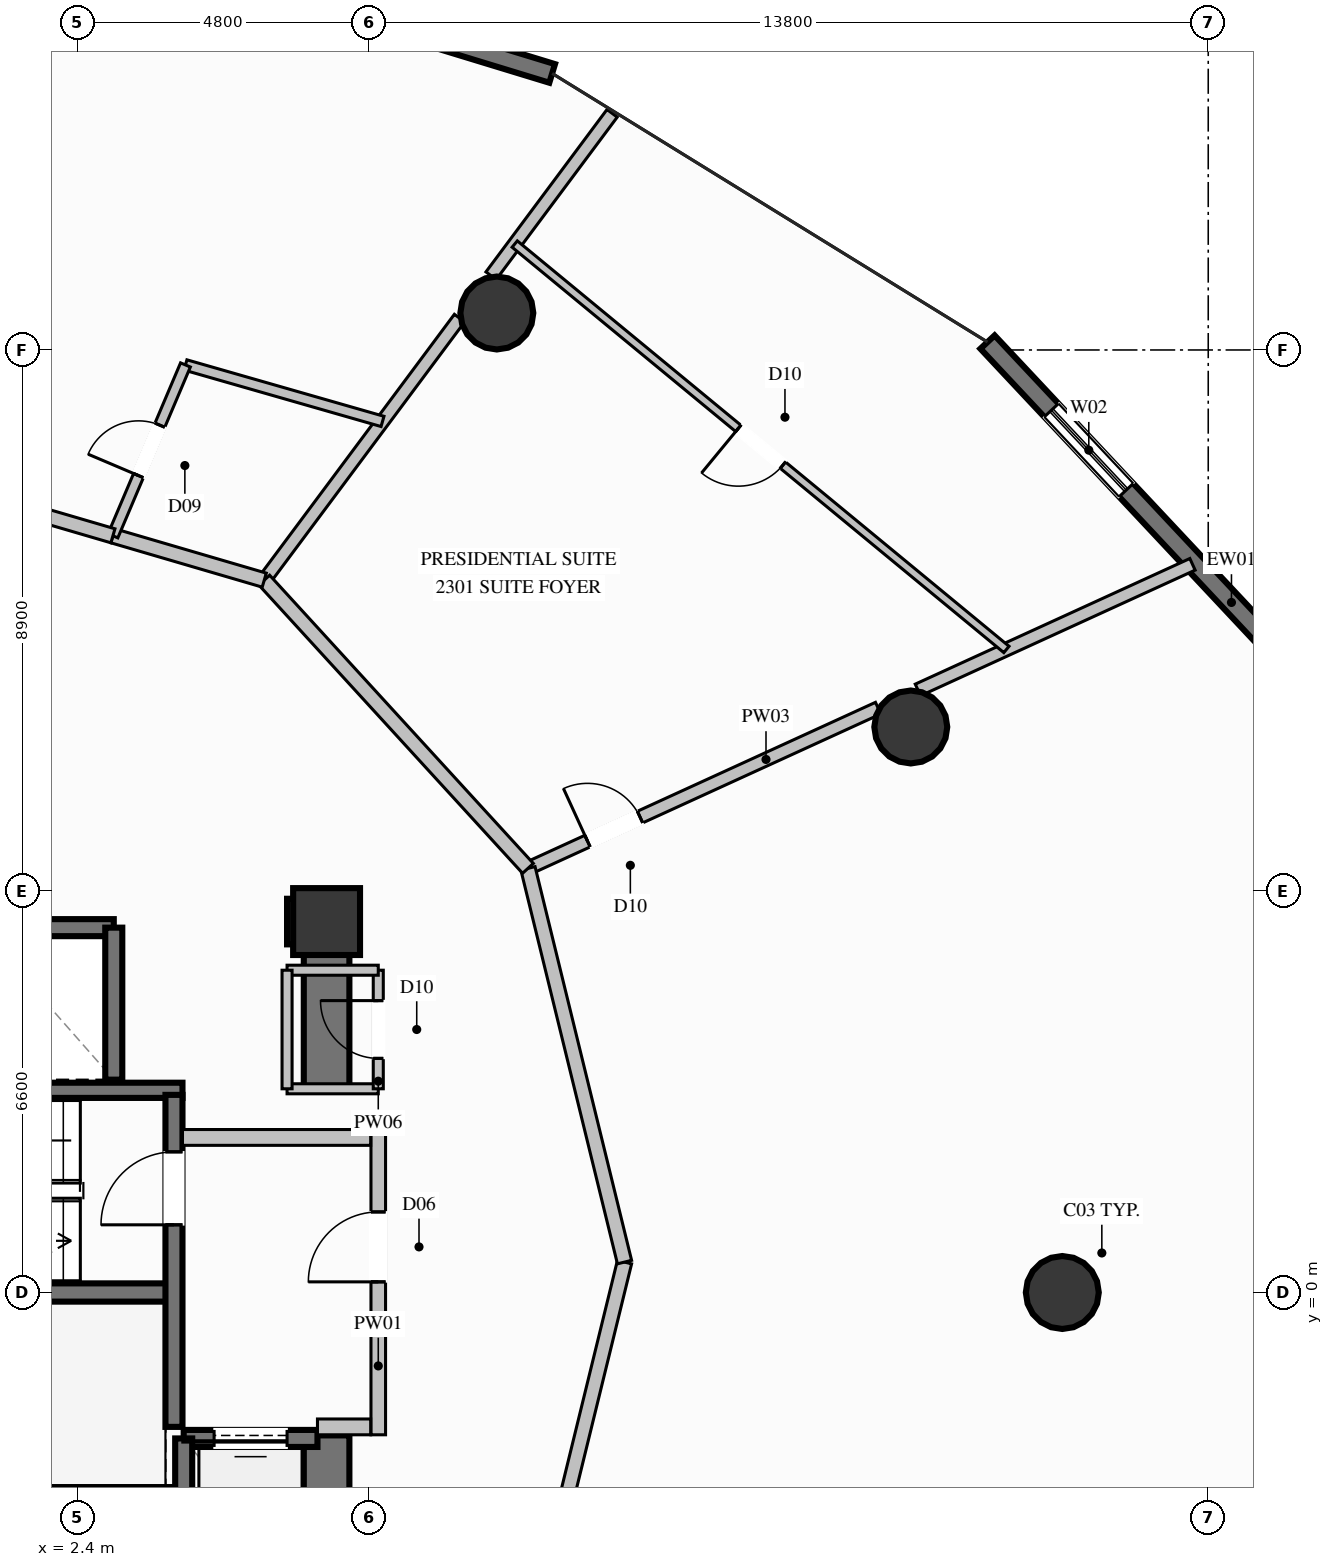
"""IFC4 building model, lengths in metres.
Left out: names, types, materials, properties, quantities, classifications, styles, units other than length and angle.
Written with IfcOpenShell. Run it as: python <this file> out.ifc"""

import sys

from ifc_helpers import new_model, si_unit, direction, frame, frame_2d, origin, origin_2d, place, context, subcontext, project, spatial, rectangle, circle, extrude, element, fill, save


model = new_model("IFC4")
c1 = context("Model", 3, precision=1e-05, world=origin(), true_north=direction((0.0, 1.0)))
c2 = subcontext(c1, "Body", "Model", "MODEL_VIEW")
j1 = project(units=[si_unit("LENGTHUNIT", "METRE"), si_unit("PLANEANGLEUNIT", "RADIAN")], contexts=[c1])
p1 = place(None, origin())
s1 = spatial("IfcSite", under=j1, at=p1, CompositionType="ELEMENT")
p2 = place(p1, origin())
s2 = spatial("IfcBuilding", under=s1, at=p2, CompositionType="ELEMENT")
p3 = place(p2, frame((0.0, 0.0, 86.0)))
s3 = spatial("IfcBuildingStorey", under=s2, at=p3, CompositionType="ELEMENT", Elevation=86.0)
p4 = place(p3, frame((6.5, 6.1, 0.0), z_axis=(0.0, 0.0, 1.0), x_axis=(1.0, 0.0, 0.0)))
e1 = element("IfcColumn", 1, at=p4, inside=s3, PredefinedType="COLUMN", context=c2, shape_type="SweptSolid", body=[
    extrude(rectangle(XDim=1.1, YDim=1.1, at=origin_2d()), origin(), (0.0, 0.0, 1.0), 3.6),
])
p5 = place(p3, frame((-3.99, 0.0, 0.0), z_axis=(0.0, 0.0, 1.0), x_axis=(1.0, 0.0, 0.0)))
e2 = element("IfcWall", 2, at=p5, inside=s3, PredefinedType="SHEAR", context=c2, shape_type="SweptSolid", body=[
    extrude(rectangle(XDim=7.98, YDim=0.3, at=frame_2d((3.99, 0.0))), origin(), (0.0, 0.0, 1.0), 3.6),
])
for number, where, z_axis, x_axis in (
    (3, (-4.13, -3.325, 0.0), (0.0, 0.0, 1.0), (1.0, 0.0, 0.0)),
    (4, (-4.13, 3.325, 0.0), (0.0, 0.0, 1.0), (1.0, 0.0, 0.0)),
):
    element("IfcWall", number, at=place(p3, frame(where, z_axis=z_axis, x_axis=x_axis)), inside=s3, PredefinedType="SOLIDWALL", context=c2, shape_type="SweptSolid", body=[
        extrude(rectangle(XDim=8.26, YDim=0.25, at=frame_2d((4.13, 0.0))), origin(), (0.0, 0.0, 1.0), 3.6),
    ])
p6 = place(p3, frame((5.85, 6.1, 0.0), z_axis=(0.0, 0.0, 1.0), x_axis=(1.0, 0.0, 0.0)))
e5 = element("IfcWall", 5, at=p6, inside=s3, PredefinedType="SHEAR", context=c2, shape_type="SweptSolid", body=[
    extrude(rectangle(XDim=0.275, YDim=0.75, at=frame_2d((0.137, 0.0))), origin(), (0.0, 0.0, 1.0), 3.6),
])
p7 = place(p3, frame((6.5, -6.475, 0.0), z_axis=(0.0, 0.0, 1.0), x_axis=(0.0, 1.0, 0.0)))
e6 = element("IfcWall", 6, at=p7, inside=s3, PredefinedType="SHEAR", context=c2, shape_type="SweptSolid", body=[
    extrude(rectangle(XDim=4.125, YDim=0.75, at=frame_2d((2.062, 0.0))), origin(), (0.0, 0.0, 1.0), 3.6),
])
p8 = place(p3, frame((6.5, 3.35, 0.0), z_axis=(0.0, 0.0, 1.0), x_axis=(0.0, 1.0, 0.0)))
e7 = element("IfcWall", 7, at=p8, inside=s3, PredefinedType="SHEAR", context=c2, shape_type="SweptSolid", body=[
    extrude(rectangle(XDim=3.125, YDim=0.75, at=frame_2d((1.562, 0.0))), origin(), (0.0, 0.0, 1.0), 3.6),
])
for number, where, z_axis, x_axis in (
    (8, (18.6, 0.0, 0.0), (0.0, 0.0, 1.0), (1.0, 0.0, 0.0)),
    (9, (16.108, 9.3, 0.0), (0.0, 0.0, 1.0), (1.0, 0.0, 0.0)),
    (10, (9.3, 16.108, 0.0), (0.0, 0.0, 1.0), (1.0, 0.0, 0.0)),
):
    element("IfcColumn", number, at=place(p3, frame(where, z_axis=z_axis, x_axis=x_axis)), inside=s3, PredefinedType="COLUMN", context=c2, shape_type="SweptSolid", body=[
        extrude(circle(Radius=0.6, at=origin_2d()), origin(), (0.0, 0.0, 1.0), 3.6),
    ])
p9 = place(p3, frame((17.37, 15.63, 0.0), z_axis=(0.0, 0.0, 1.0), x_axis=(0.683723849235, -0.729740843031, 0.0)))
e11 = element("IfcWall", 11, at=p9, inside=s3, PredefinedType="SOLIDWALL", context=c2, shape_type="SweptSolid", body=[
    extrude(rectangle(XDim=8.149, YDim=0.32, at=frame_2d((4.075, 0.0))), origin(), (0.0, 0.0, 1.0), 3.34),
])
p10 = place(p9, frame((1.536, 0.0, 0.35)))
e12 = element("IfcOpeningElement", 12, at=p10, cuts=e11, PredefinedType="OPENING", context=c2, shape_type="SweptSolid", body=[
    extrude(rectangle(XDim=1.8, YDim=2.6, at=frame_2d((0.9, 1.3))), frame((0.0, 0.17, 0.0), z_axis=(0.0, -1.0, 0.0), x_axis=(1.0, 0.0, 0.0)), (0.0, 0.0, 1.0), 0.34),
])
p11 = place(p3, frame((2.164, 22.503, 0.0), z_axis=(0.0, 0.0, 1.0), x_axis=(0.956472250056, -0.291823293917, 0.0)))
e13 = element("IfcWall", 13, at=p11, inside=s3, PredefinedType="SOLIDWALL", context=c2, shape_type="SweptSolid", body=[
    extrude(rectangle(XDim=8.412, YDim=0.32, at=frame_2d((4.206, 0.0))), origin(), (0.0, 0.0, 1.0), 3.34),
])
p12 = place(p11, frame((3.306, 0.0, 0.35)))
e14 = element("IfcOpeningElement", 14, at=p12, cuts=e13, PredefinedType="OPENING", context=c2, shape_type="SweptSolid", body=[
    extrude(rectangle(XDim=1.8, YDim=2.6, at=frame_2d((0.9, 1.3))), frame((0.0, 0.17, 0.0), z_axis=(0.0, -1.0, 0.0), x_axis=(1.0, 0.0, 0.0)), (0.0, 0.0, 1.0), 0.34),
])
p13 = place(p3, frame((3.0, 6.0, 0.0), z_axis=(0.0, 0.0, 1.0), x_axis=(-1.0, 0.0, 0.0)))
e15 = element("IfcWall", 15, at=p13, inside=s3, PredefinedType="SOLIDWALL", context=c2, shape_type="SweptSolid", body=[
    extrude(rectangle(XDim=2.2, YDim=0.28, at=frame_2d((1.1, 0.0))), origin(), (0.0, 0.0, 1.0), 3.34),
])
p14 = place(p3, frame((3.0, 3.5, 0.0), z_axis=(0.0, 0.0, 1.0), x_axis=(0.0, 1.0, 0.0)))
e16 = element("IfcWall", 16, at=p14, inside=s3, PredefinedType="SOLIDWALL", context=c2, shape_type="SweptSolid", body=[
    extrude(rectangle(XDim=2.5, YDim=0.28, at=frame_2d((1.25, 0.0))), origin(), (0.0, 0.0, 1.0), 3.34),
])
p15 = place(p3, frame((6.35, -2.4, 0.0), z_axis=(0.0, 0.0, 1.0), x_axis=(-1.0, 0.0, 0.0)))
e17 = element("IfcWall", 17, at=p15, inside=s3, PredefinedType="SOLIDWALL", context=c2, shape_type="SweptSolid", body=[
    extrude(rectangle(XDim=2.2, YDim=0.28, at=frame_2d((1.1, 0.0))), origin(), (0.0, 0.0, 1.0), 3.34),
])
p16 = place(p15, frame((0.5, 0.0, 0.0)))
e18 = element("IfcOpeningElement", 18, at=p16, cuts=e17, PredefinedType="OPENING", context=c2, shape_type="SweptSolid", body=[
    extrude(rectangle(XDim=1.2, YDim=2.2, at=frame_2d((0.6, 1.1))), frame((0.0, 0.15, 0.0), z_axis=(0.0, -1.0, 0.0), x_axis=(1.0, 0.0, 0.0)), (0.0, 0.0, 1.0), 0.3),
])
p17 = place(p3, frame((4.15, -2.4, 0.0), z_axis=(0.0, 0.0, 1.0), x_axis=(0.0, -1.0, 0.0)))
e19 = element("IfcWall", 19, at=p17, inside=s3, PredefinedType="SOLIDWALL", context=c2, shape_type="SweptSolid", body=[
    extrude(rectangle(XDim=2.7, YDim=0.28, at=frame_2d((1.35, 0.0))), origin(), (0.0, 0.0, 1.0), 3.34),
])
p18 = place(p3, frame((3.99, -2.21, 0.0), z_axis=(0.0, 0.0, 1.0), x_axis=(0.0, 1.0, 0.0)))
e20 = element("IfcWall", 20, at=p18, inside=s3, PredefinedType="SOLIDWALL", context=c2, shape_type="SweptSolid", body=[
    extrude(rectangle(XDim=5.46, YDim=0.28, at=frame_2d((2.73, 0.0))), origin(), (0.0, 0.0, 1.0), 3.34),
])
p19 = place(p18, frame((3.323, 0.0, 0.0)))
e21 = element("IfcOpeningElement", 21, at=p19, cuts=e20, PredefinedType="OPENING", context=c2, shape_type="SweptSolid", body=[
    extrude(rectangle(XDim=1.2, YDim=2.2, at=frame_2d((0.6, 1.1))), frame((0.0, 0.15, 0.0), z_axis=(0.0, -1.0, 0.0), x_axis=(1.0, 0.0, 0.0)), (0.0, 0.0, 1.0), 0.3),
])
p20 = place(p3, frame((7.35, -2.34, 0.0), z_axis=(0.0, 0.0, 1.0), x_axis=(0.0, 1.0, 0.0)))
e22 = element("IfcWall", 22, at=p20, inside=s3, PredefinedType="PARTITIONING", context=c2, shape_type="SweptSolid", body=[
    extrude(rectangle(XDim=5.02, YDim=0.24, at=frame_2d((2.51, 0.0))), origin(), (0.0, 0.0, 1.0), 2.425),
])
p21 = place(p20, frame((2.515, 0.0, 0.0)))
e23 = element("IfcOpeningElement", 23, at=p21, cuts=e22, PredefinedType="OPENING", context=c2, shape_type="SweptSolid", body=[
    extrude(rectangle(XDim=1.15, YDim=2.2, at=frame_2d((0.575, 1.1))), frame((0.0, 0.13, 0.0), z_axis=(0.0, -1.0, 0.0), x_axis=(1.0, 0.0, 0.0)), (0.0, 0.0, 1.0), 0.26),
])
p22 = place(p3, frame((6.35, -2.21, 0.0), z_axis=(0.0, 0.0, 1.0), x_axis=(1.0, 0.0, 0.0)))
e24 = element("IfcWall", 24, at=p22, inside=s3, PredefinedType="PARTITIONING", context=c2, shape_type="SweptSolid", body=[
    extrude(rectangle(XDim=0.875, YDim=0.26, at=frame_2d((0.438, 0.0))), origin(), (0.0, 0.0, 1.0), 3.34),
])
p23 = place(p3, frame((4.13, 2.55, 0.0), z_axis=(0.0, 0.0, 1.0), x_axis=(1.0, 0.0, 0.0)))
e25 = element("IfcWall", 25, at=p23, inside=s3, PredefinedType="PARTITIONING", context=c2, shape_type="SweptSolid", body=[
    extrude(rectangle(XDim=3.095, YDim=0.26, at=frame_2d((1.548, 0.0))), origin(), (0.0, 0.0, 1.0), 3.34),
])
p24 = place(p3, frame((5.85, 3.35, 0.0), z_axis=(0.0, 0.0, 1.0), x_axis=(1.0, 0.0, 0.0)))
e26 = element("IfcWall", 26, at=p24, inside=s3, PredefinedType="PARTITIONING", context=c2, shape_type="SweptSolid", body=[
    extrude(rectangle(XDim=1.5, YDim=0.165, at=frame_2d((0.75, 0.0))), origin(), (0.0, 0.0, 1.0), 3.34),
])
p25 = place(p3, frame((7.35, 3.35, 0.0), z_axis=(0.0, 0.0, 1.0), x_axis=(0.0, 1.0, 0.0)))
e27 = element("IfcWall", 27, at=p25, inside=s3, PredefinedType="PARTITIONING", context=c2, shape_type="SweptSolid", body=[
    extrude(rectangle(XDim=1.95, YDim=0.165, at=frame_2d((0.975, 0.0))), origin(), (0.0, 0.0, 1.0), 3.34),
])
p26 = place(p25, frame((0.5, 0.0, 0.0)))
e28 = element("IfcOpeningElement", 28, at=p26, cuts=e27, PredefinedType="OPENING", context=c2, shape_type="SweptSolid", body=[
    extrude(rectangle(XDim=0.95, YDim=2.1, at=frame_2d((0.475, 1.05))), frame((0.0, 0.093, 0.0), z_axis=(0.0, -1.0, 0.0), x_axis=(1.0, 0.0, 0.0)), (0.0, 0.0, 1.0), 0.185),
])
p27 = place(p3, frame((7.35, 5.3, 0.0), z_axis=(0.0, 0.0, 1.0), x_axis=(-1.0, 0.0, 0.0)))
e29 = element("IfcWall", 29, at=p27, inside=s3, PredefinedType="PARTITIONING", context=c2, shape_type="SweptSolid", body=[
    extrude(rectangle(XDim=1.5, YDim=0.165, at=frame_2d((0.75, 0.0))), origin(), (0.0, 0.0, 1.0), 2.425),
])
p28 = place(p3, frame((5.85, 5.3, 0.0), z_axis=(0.0, 0.0, 1.0), x_axis=(0.0, -1.0, 0.0)))
e30 = element("IfcWall", 30, at=p28, inside=s3, PredefinedType="PARTITIONING", context=c2, shape_type="SweptSolid", body=[
    extrude(rectangle(XDim=1.95, YDim=0.165, at=frame_2d((0.975, 0.0))), origin(), (0.0, 0.0, 1.0), 2.425),
])
p29 = place(p3, frame((9.812, 6.975, 0.0), z_axis=(0.0, 0.0, 1.0), x_axis=(0.90933657519, 0.416061285176, 0.0)))
e31 = element("IfcWall", 31, at=p29, inside=s3, PredefinedType="PARTITIONING", context=c2, shape_type="SweptSolid", body=[
    extrude(rectangle(XDim=6.333, YDim=0.21, at=frame_2d((3.167, 0.0))), origin(), (0.0, 0.0, 1.0), 2.709),
])
p30 = place(p29, frame((1.077, 0.0, 0.0)))
e32 = element("IfcOpeningElement", 32, at=p30, cuts=e31, PredefinedType="OPENING", context=c2, shape_type="SweptSolid", body=[
    extrude(rectangle(XDim=0.95, YDim=2.1, at=frame_2d((0.475, 1.05))), frame((0.0, 0.115, 0.0), z_axis=(0.0, -1.0, 0.0), x_axis=(1.0, 0.0, 0.0)), (0.0, 0.0, 1.0), 0.23),
])
p31 = place(p3, frame((16.225, 9.909, 0.0), z_axis=(0.0, 0.0, 1.0), x_axis=(0.909340055563, 0.416053678447, 0.0)))
e33 = element("IfcWall", 33, at=p31, inside=s3, PredefinedType="PARTITIONING", context=c2, shape_type="SweptSolid", body=[
    extrude(rectangle(XDim=4.966, YDim=0.21, at=frame_2d((2.483, 0.0))), origin(), (0.0, 0.0, 1.0), 3.34),
])
p32 = place(p3, frame((5.475, 11.715, 0.0), z_axis=(0.0, 0.0, 1.0), x_axis=(0.597532875514, 0.801844413013, 0.0)))
e34 = element("IfcWall", 34, at=p32, inside=s3, PredefinedType="PARTITIONING", context=c2, shape_type="SweptSolid", body=[
    extrude(rectangle(XDim=5.374, YDim=0.21, at=frame_2d((2.687, 0.0))), origin(), (0.0, 0.0, 1.0), 2.709),
])
p33 = place(p3, frame((9.205, 16.721, 0.0), z_axis=(0.0, 0.0, 1.0), x_axis=(0.597617135321, 0.801781615885, 0.0)))
e35 = element("IfcWall", 35, at=p33, inside=s3, PredefinedType="PARTITIONING", context=c2, shape_type="SweptSolid", body=[
    extrude(rectangle(XDim=3.332, YDim=0.21, at=frame_2d((1.666, 0.0))), origin(), (0.0, 0.0, 1.0), 3.34),
])
for number, where, z_axis, x_axis in (
    (36, (9.812, -5.975, 0.0), (0.0, 0.0, 1.0), (0.238, 0.971, 0.0)),
    (37, (11.4, 0.5, 0.0), (0.0, 0.0, 1.0), (-0.238, 0.971, 0.0)),
):
    element("IfcWall", number, at=place(p3, frame(where, z_axis=z_axis, x_axis=x_axis)), inside=s3, PredefinedType="PARTITIONING", context=c2, shape_type="SweptSolid", body=[
        extrude(rectangle(XDim=6.667, YDim=0.24, at=frame_2d((3.333, 0.0))), origin(), (0.0, 0.0, 1.0), 3.34),
    ])
p34 = place(p3, frame((9.812, 6.975, 0.0), z_axis=(0.0, 0.0, 1.0), x_axis=(-0.675041189424, 0.737780043496, 0.0)))
e38 = element("IfcWall", 38, at=p34, inside=s3, PredefinedType="PARTITIONING", context=c2, shape_type="SweptSolid", body=[
    extrude(rectangle(XDim=6.425, YDim=0.24, at=frame_2d((3.212, 0.0))), origin(), (0.0, 0.0, 1.0), 3.34),
])
p35 = place(p3, frame((17.681, 10.575, 0.0), z_axis=(0.0, 0.0, 1.0), x_axis=(-0.77159392409, 0.636115411154, 0.0)))
e39 = element("IfcWall", 39, at=p35, inside=s3, PredefinedType="PARTITIONING", context=c2, shape_type="SweptSolid", body=[
    extrude(rectangle(XDim=10.481, YDim=0.135, at=frame_2d((5.24, 0.0))), origin(), (0.0, 0.0, 1.0), 3.34),
])
p36 = place(p35, frame((4.765, 0.0, 0.0)))
e40 = element("IfcOpeningElement", 40, at=p36, cuts=e39, PredefinedType="OPENING", context=c2, shape_type="SweptSolid", body=[
    extrude(rectangle(XDim=0.95, YDim=2.1, at=frame_2d((0.475, 1.05))), frame((0.0, 0.078, 0.0), z_axis=(0.0, -1.0, 0.0), x_axis=(1.0, 0.0, 0.0)), (0.0, 0.0, 1.0), 0.155),
])
p37 = place(p3, frame((5.475, 11.715, 0.0), z_axis=(0.0, 0.0, 1.0), x_axis=(-0.959684159597, 0.281080618005, 0.0)))
e41 = element("IfcWall", 41, at=p37, inside=s3, PredefinedType="PARTITIONING", context=c2, shape_type="SweptSolid", body=[
    extrude(rectangle(XDim=2.594, YDim=0.24, at=frame_2d((1.297, 0.0))), origin(), (0.0, 0.0, 1.0), 2.917),
])
p38 = place(p3, frame((7.42, 14.325, 0.0), z_axis=(0.0, 0.0, 1.0), x_axis=(-0.961291333748, 0.275533975511, 0.0)))
e42 = element("IfcWall", 42, at=p38, inside=s3, PredefinedType="PLUMBINGWALL", context=c2, shape_type="SweptSolid", body=[
    extrude(rectangle(XDim=3.372, YDim=0.175, at=frame_2d((1.686, 0.0))), origin(), (0.0, 0.0, 1.0), 3.34),
])
p39 = place(p3, frame((2.986, 12.444, 0.0), z_axis=(0.0, 0.0, 1.0), x_axis=(0.39077987689, 0.920484159461, 0.0)))
e43 = element("IfcWall", 43, at=p39, inside=s3, PredefinedType="PLUMBINGWALL", context=c2, shape_type="SweptSolid", body=[
    extrude(rectangle(XDim=3.052, YDim=0.175, at=frame_2d((1.526, 0.0))), origin(), (0.0, 0.0, 1.0), 3.34),
])
p40 = place(p39, frame((1.076, 0.0, 0.0)))
e44 = element("IfcOpeningElement", 44, at=p40, cuts=e43, PredefinedType="OPENING", context=c2, shape_type="SweptSolid", body=[
    extrude(rectangle(XDim=0.9, YDim=2.1, at=frame_2d((0.45, 1.05))), frame((0.0, 0.098, 0.0), z_axis=(0.0, -1.0, 0.0), x_axis=(1.0, 0.0, 0.0)), (0.0, 0.0, 1.0), 0.195),
])
p41 = place(p3, frame((2.986, 12.444, 0.0), z_axis=(0.0, 0.0, 1.0), x_axis=(-0.959723057579, 0.280947775844, 0.0)))
e45 = element("IfcWall", 45, at=p41, inside=s3, PredefinedType="PARTITIONING", context=c2, shape_type="SweptSolid", body=[
    extrude(rectangle(XDim=3.58, YDim=0.24, at=frame_2d((1.79, 0.0))), origin(), (0.0, 0.0, 1.0), 2.917),
])
p42 = place(p41, frame((1.24, 0.0, 0.0)))
e46 = element("IfcOpeningElement", 46, at=p42, cuts=e45, PredefinedType="OPENING", context=c2, shape_type="SweptSolid", body=[
    extrude(rectangle(XDim=1.1, YDim=2.3, at=frame_2d((0.55, 1.15))), frame((0.0, 0.13, 0.0), z_axis=(0.0, -1.0, 0.0), x_axis=(1.0, 0.0, 0.0)), (0.0, 0.0, 1.0), 0.26),
])
p43 = place(p10, origin())
e47 = element("IfcWindow", 47, at=p43, inside=s3, PartitioningType="SINGLE_PANEL", PredefinedType="WINDOW", context=c2, shape_type="SweptSolid", body=[
    extrude(rectangle(XDim=1.8, YDim=2.6, at=frame_2d((0.9, 1.3))), frame((0.0, 0.03, 0.0), z_axis=(0.0, -1.0, 0.0), x_axis=(1.0, 0.0, 0.0)), (0.0, 0.0, 1.0), 0.06),
])
fill(e12, e47)
p44 = place(p16, origin())
e48 = element("IfcDoor", 48, at=p44, inside=s3, OperationType="SLIDING_TO_LEFT", PredefinedType="DOOR", context=c2, shape_type="SweptSolid", body=[
    extrude(rectangle(XDim=1.2, YDim=2.2, at=frame_2d((0.6, 1.1))), frame((0.0, 0.025, 0.0), z_axis=(0.0, -1.0, 0.0), x_axis=(1.0, 0.0, 0.0)), (0.0, 0.0, 1.0), 0.05),
])
fill(e18, e48)
p45 = place(p19, origin())
e49 = element("IfcDoor", 49, at=p45, inside=s3, OperationType="SINGLE_SWING_LEFT", PredefinedType="DOOR", context=c2, shape_type="SweptSolid", body=[
    extrude(rectangle(XDim=1.2, YDim=2.2, at=frame_2d((0.6, 1.1))), frame((0.0, 0.025, 0.0), z_axis=(0.0, -1.0, 0.0), x_axis=(1.0, 0.0, 0.0)), (0.0, 0.0, 1.0), 0.05),
])
fill(e21, e49)
p46 = place(p21, origin())
e50 = element("IfcDoor", 50, at=p46, inside=s3, OperationType="SINGLE_SWING_LEFT", PredefinedType="DOOR", context=c2, shape_type="SweptSolid", body=[
    extrude(rectangle(XDim=1.15, YDim=2.2, at=frame_2d((0.575, 1.1))), frame((0.0, 0.025, 0.0), z_axis=(0.0, -1.0, 0.0), x_axis=(1.0, 0.0, 0.0)), (0.0, 0.0, 1.0), 0.05),
])
fill(e23, e50)
p47 = place(p26, origin())
e51 = element("IfcDoor", 51, at=p47, inside=s3, OperationType="SINGLE_SWING_RIGHT", PredefinedType="DOOR", context=c2, shape_type="SweptSolid", body=[
    extrude(rectangle(XDim=0.95, YDim=2.1, at=frame_2d((0.475, 1.05))), frame((0.0, 0.025, 0.0), z_axis=(0.0, -1.0, 0.0), x_axis=(1.0, 0.0, 0.0)), (0.0, 0.0, 1.0), 0.05),
])
fill(e28, e51)
p48 = place(p30, origin())
e52 = element("IfcDoor", 52, at=p48, inside=s3, OperationType="SINGLE_SWING_LEFT", PredefinedType="DOOR", context=c2, shape_type="SweptSolid", body=[
    extrude(rectangle(XDim=0.95, YDim=2.1, at=frame_2d((0.475, 1.05))), frame((0.0, 0.025, 0.0), z_axis=(0.0, -1.0, 0.0), x_axis=(1.0, 0.0, 0.0)), (0.0, 0.0, 1.0), 0.05),
])
fill(e32, e52)
p49 = place(p36, origin())
e53 = element("IfcDoor", 53, at=p49, inside=s3, OperationType="SINGLE_SWING_RIGHT", PredefinedType="DOOR", context=c2, shape_type="SweptSolid", body=[
    extrude(rectangle(XDim=0.95, YDim=2.1, at=frame_2d((0.475, 1.05))), frame((0.0, 0.025, 0.0), z_axis=(0.0, -1.0, 0.0), x_axis=(1.0, 0.0, 0.0)), (0.0, 0.0, 1.0), 0.05),
])
fill(e40, e53)
p50 = place(p40, origin())
e54 = element("IfcDoor", 54, at=p50, inside=s3, OperationType="SINGLE_SWING_LEFT", PredefinedType="DOOR", context=c2, shape_type="SweptSolid", body=[
    extrude(rectangle(XDim=0.9, YDim=2.1, at=frame_2d((0.45, 1.05))), frame((0.0, 0.025, 0.0), z_axis=(0.0, -1.0, 0.0), x_axis=(1.0, 0.0, 0.0)), (0.0, 0.0, 1.0), 0.05),
])
fill(e44, e54)
save(model, sys.argv[1])
